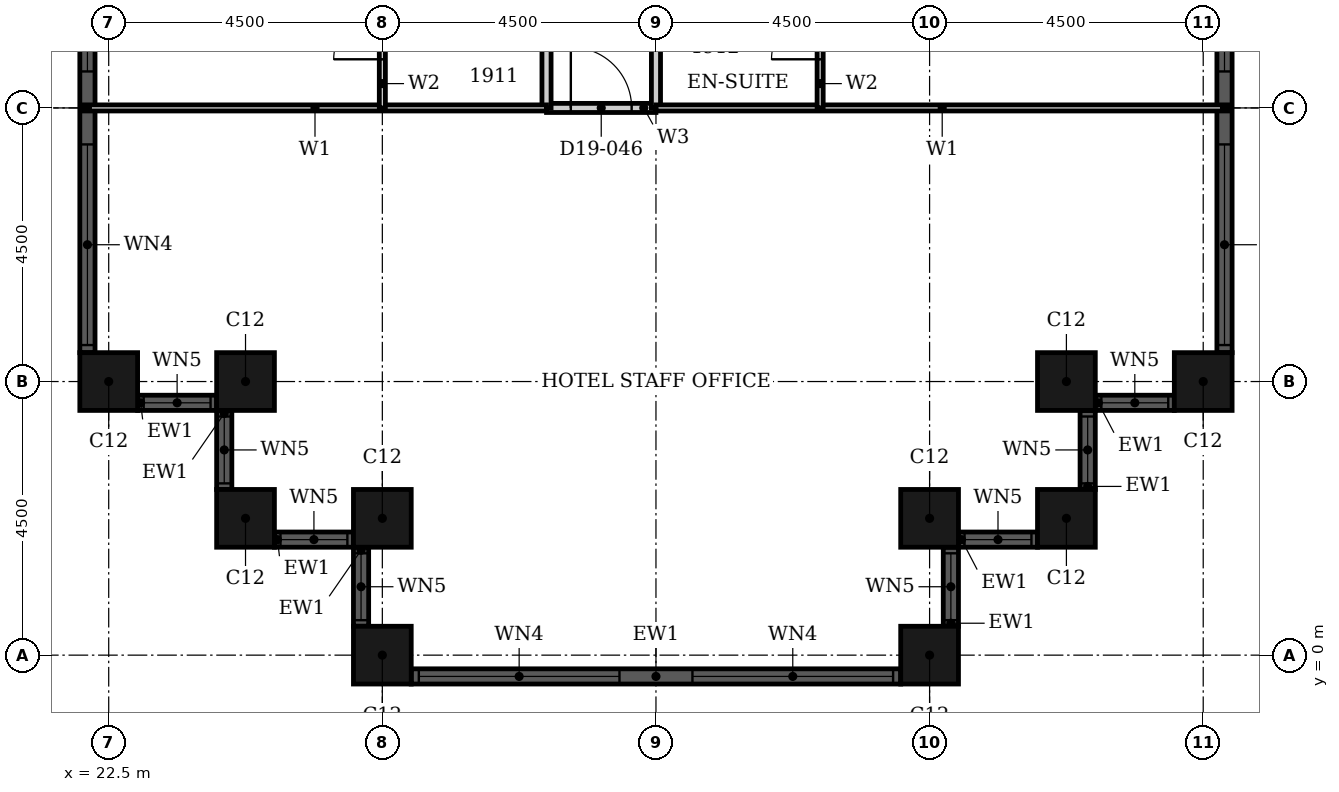
"""IFC4 building model, lengths in metres.
Left out: names, types, materials, properties, quantities, classifications, styles, units other than length and angle.
Written with IfcOpenShell. Run it as: python <this file> out.ifc"""

import sys

from ifc_helpers import new_model, si_unit, direction, frame, frame_2d, origin, origin_2d, place, context, subcontext, project, spatial, rectangle, hollow_rectangle, extrude, element, fill, save


model = new_model("IFC4")
c1 = context("Model", 3, precision=1e-05, world=origin(), true_north=direction((0.0, 1.0)))
c2 = subcontext(c1, "Body", "Model", "MODEL_VIEW")
j1 = project(units=[si_unit("LENGTHUNIT", "METRE"), si_unit("PLANEANGLEUNIT", "RADIAN")], contexts=[c1])
p1 = place(None, origin())
s1 = spatial("IfcSite", under=j1, at=p1, CompositionType="ELEMENT")
p2 = place(p1, origin())
s2 = spatial("IfcBuilding", under=s1, at=p2, CompositionType="ELEMENT")
p3 = place(p2, frame((0.0, 0.0, 81.6)))
s3 = spatial("IfcBuildingStorey", under=s2, at=p3, CompositionType="ELEMENT", Elevation=81.6)
for number, where, z_axis, x_axis in (
    (1, (22.5, 4.5, 0.0), (0.0, 0.0, 1.0), (1.0, 0.0, 0.0)),
    (2, (24.75, 4.5, 0.0), (0.0, 0.0, 1.0), (1.0, 0.0, 0.0)),
    (3, (24.75, 2.25, 0.0), (0.0, 0.0, 1.0), (1.0, 0.0, 0.0)),
    (4, (27.0, 2.25, 0.0), (0.0, 0.0, 1.0), (1.0, 0.0, 0.0)),
    (5, (27.0, 0.0, 0.0), (0.0, 0.0, 1.0), (1.0, 0.0, 0.0)),
    (6, (36.0, 0.0, 0.0), (0.0, 0.0, 1.0), (1.0, 0.0, 0.0)),
    (7, (36.0, 2.25, 0.0), (0.0, 0.0, 1.0), (1.0, 0.0, 0.0)),
    (8, (38.25, 2.25, 0.0), (0.0, 0.0, 1.0), (1.0, 0.0, 0.0)),
    (9, (38.25, 4.5, 0.0), (0.0, 0.0, 1.0), (1.0, 0.0, 0.0)),
    (10, (40.5, 4.5, 0.0), (0.0, 0.0, 1.0), (1.0, 0.0, 0.0)),
):
    element("IfcColumn", number, at=place(p3, frame(where, z_axis=z_axis, x_axis=x_axis)), inside=s3, PredefinedType="COLUMN", context=c2, shape_type="SweptSolid", body=[
        extrude(hollow_rectangle(XDim=0.95, YDim=0.95, WallThickness=0.03, at=origin_2d()), origin(), (0.0, 0.0, 1.0), 3.6),
    ])
p4 = place(p3, frame((22.975, 4.15, 0.0), z_axis=(0.0, 0.0, 1.0), x_axis=(1.0, 0.0, 0.0)))
e11 = element("IfcWall", 11, at=p4, inside=s3, PredefinedType="SOLIDWALL", context=c2, shape_type="SweptSolid", body=[
    extrude(rectangle(XDim=1.3, YDim=0.25, at=frame_2d((0.65, 0.0))), origin(), (0.0, 0.0, 1.0), 3.6),
])
p5 = place(p4, frame((0.1, 0.0, 0.9)))
e12 = element("IfcOpeningElement", 12, at=p5, cuts=e11, PredefinedType="OPENING", context=c2, shape_type="SweptSolid", body=[
    extrude(rectangle(XDim=1.1, YDim=2.08, at=frame_2d((0.55, 1.04))), frame((0.0, 0.135, 0.0), z_axis=(0.0, -1.0, 0.0), x_axis=(1.0, 0.0, 0.0)), (0.0, 0.0, 1.0), 0.27),
])
p6 = place(p3, frame((24.4, 4.025, 0.0), z_axis=(0.0, 0.0, 1.0), x_axis=(0.0, -1.0, 0.0)))
e13 = element("IfcWall", 13, at=p6, inside=s3, PredefinedType="SOLIDWALL", context=c2, shape_type="SweptSolid", body=[
    extrude(rectangle(XDim=1.3, YDim=0.25, at=frame_2d((0.65, 0.0))), origin(), (0.0, 0.0, 1.0), 3.6),
])
p7 = place(p6, frame((0.1, 0.0, 0.9)))
e14 = element("IfcOpeningElement", 14, at=p7, cuts=e13, PredefinedType="OPENING", context=c2, shape_type="SweptSolid", body=[
    extrude(rectangle(XDim=1.1, YDim=2.08, at=frame_2d((0.55, 1.04))), frame((0.0, 0.135, 0.0), z_axis=(0.0, -1.0, 0.0), x_axis=(1.0, 0.0, 0.0)), (0.0, 0.0, 1.0), 0.27),
])
p8 = place(p3, frame((25.225, 1.9, 0.0), z_axis=(0.0, 0.0, 1.0), x_axis=(1.0, 0.0, 0.0)))
e15 = element("IfcWall", 15, at=p8, inside=s3, PredefinedType="SOLIDWALL", context=c2, shape_type="SweptSolid", body=[
    extrude(rectangle(XDim=1.3, YDim=0.25, at=frame_2d((0.65, 0.0))), origin(), (0.0, 0.0, 1.0), 3.6),
])
p9 = place(p8, frame((0.1, 0.0, 0.9)))
e16 = element("IfcOpeningElement", 16, at=p9, cuts=e15, PredefinedType="OPENING", context=c2, shape_type="SweptSolid", body=[
    extrude(rectangle(XDim=1.1, YDim=2.08, at=frame_2d((0.55, 1.04))), frame((0.0, 0.135, 0.0), z_axis=(0.0, -1.0, 0.0), x_axis=(1.0, 0.0, 0.0)), (0.0, 0.0, 1.0), 0.27),
])
p10 = place(p3, frame((26.65, 1.775, 0.0), z_axis=(0.0, 0.0, 1.0), x_axis=(0.0, -1.0, 0.0)))
e17 = element("IfcWall", 17, at=p10, inside=s3, PredefinedType="SOLIDWALL", context=c2, shape_type="SweptSolid", body=[
    extrude(rectangle(XDim=1.3, YDim=0.25, at=frame_2d((0.65, 0.0))), origin(), (0.0, 0.0, 1.0), 3.6),
])
p11 = place(p10, frame((0.1, 0.0, 0.9)))
e18 = element("IfcOpeningElement", 18, at=p11, cuts=e17, PredefinedType="OPENING", context=c2, shape_type="SweptSolid", body=[
    extrude(rectangle(XDim=1.1, YDim=2.08, at=frame_2d((0.55, 1.04))), frame((0.0, 0.135, 0.0), z_axis=(0.0, -1.0, 0.0), x_axis=(1.0, 0.0, 0.0)), (0.0, 0.0, 1.0), 0.27),
])
p12 = place(p3, frame((27.475, -0.35, 0.0), z_axis=(0.0, 0.0, 1.0), x_axis=(1.0, 0.0, 0.0)))
e19 = element("IfcWall", 19, at=p12, inside=s3, PredefinedType="SOLIDWALL", context=c2, shape_type="SweptSolid", body=[
    extrude(rectangle(XDim=8.05, YDim=0.25, at=frame_2d((4.025, 0.0))), origin(), (0.0, 0.0, 1.0), 3.6),
])
p13 = place(p12, frame((0.125, 0.0, 0.9)))
e20 = element("IfcOpeningElement", 20, at=p13, cuts=e19, PredefinedType="OPENING", context=c2, shape_type="SweptSolid", body=[
    extrude(rectangle(XDim=3.3, YDim=2.08, at=frame_2d((1.65, 1.04))), frame((0.0, 0.135, 0.0), z_axis=(0.0, -1.0, 0.0), x_axis=(1.0, 0.0, 0.0)), (0.0, 0.0, 1.0), 0.27),
])
p14 = place(p12, frame((4.625, 0.0, 0.9)))
e21 = element("IfcOpeningElement", 21, at=p14, cuts=e19, PredefinedType="OPENING", context=c2, shape_type="SweptSolid", body=[
    extrude(rectangle(XDim=3.3, YDim=2.08, at=frame_2d((1.65, 1.04))), frame((0.0, 0.135, 0.0), z_axis=(0.0, -1.0, 0.0), x_axis=(1.0, 0.0, 0.0)), (0.0, 0.0, 1.0), 0.27),
])
p15 = place(p3, frame((36.35, 0.475, 0.0), z_axis=(0.0, 0.0, 1.0), x_axis=(0.0, 1.0, 0.0)))
e22 = element("IfcWall", 22, at=p15, inside=s3, PredefinedType="SOLIDWALL", context=c2, shape_type="SweptSolid", body=[
    extrude(rectangle(XDim=1.3, YDim=0.25, at=frame_2d((0.65, 0.0))), origin(), (0.0, 0.0, 1.0), 3.6),
])
p16 = place(p15, frame((0.1, 0.0, 0.9)))
e23 = element("IfcOpeningElement", 23, at=p16, cuts=e22, PredefinedType="OPENING", context=c2, shape_type="SweptSolid", body=[
    extrude(rectangle(XDim=1.1, YDim=2.08, at=frame_2d((0.55, 1.04))), frame((0.0, 0.135, 0.0), z_axis=(0.0, -1.0, 0.0), x_axis=(1.0, 0.0, 0.0)), (0.0, 0.0, 1.0), 0.27),
])
p17 = place(p3, frame((36.475, 1.9, 0.0), z_axis=(0.0, 0.0, 1.0), x_axis=(1.0, 0.0, 0.0)))
e24 = element("IfcWall", 24, at=p17, inside=s3, PredefinedType="SOLIDWALL", context=c2, shape_type="SweptSolid", body=[
    extrude(rectangle(XDim=1.3, YDim=0.25, at=frame_2d((0.65, 0.0))), origin(), (0.0, 0.0, 1.0), 3.6),
])
p18 = place(p17, frame((0.1, 0.0, 0.9)))
e25 = element("IfcOpeningElement", 25, at=p18, cuts=e24, PredefinedType="OPENING", context=c2, shape_type="SweptSolid", body=[
    extrude(rectangle(XDim=1.1, YDim=2.08, at=frame_2d((0.55, 1.04))), frame((0.0, 0.135, 0.0), z_axis=(0.0, -1.0, 0.0), x_axis=(1.0, 0.0, 0.0)), (0.0, 0.0, 1.0), 0.27),
])
p19 = place(p3, frame((38.6, 2.725, 0.0), z_axis=(0.0, 0.0, 1.0), x_axis=(0.0, 1.0, 0.0)))
e26 = element("IfcWall", 26, at=p19, inside=s3, PredefinedType="SOLIDWALL", context=c2, shape_type="SweptSolid", body=[
    extrude(rectangle(XDim=1.3, YDim=0.25, at=frame_2d((0.65, 0.0))), origin(), (0.0, 0.0, 1.0), 3.6),
])
p20 = place(p19, frame((0.1, 0.0, 0.9)))
e27 = element("IfcOpeningElement", 27, at=p20, cuts=e26, PredefinedType="OPENING", context=c2, shape_type="SweptSolid", body=[
    extrude(rectangle(XDim=1.1, YDim=2.08, at=frame_2d((0.55, 1.04))), frame((0.0, 0.135, 0.0), z_axis=(0.0, -1.0, 0.0), x_axis=(1.0, 0.0, 0.0)), (0.0, 0.0, 1.0), 0.27),
])
p21 = place(p3, frame((38.725, 4.15, 0.0), z_axis=(0.0, 0.0, 1.0), x_axis=(1.0, 0.0, 0.0)))
e28 = element("IfcWall", 28, at=p21, inside=s3, PredefinedType="SOLIDWALL", context=c2, shape_type="SweptSolid", body=[
    extrude(rectangle(XDim=1.3, YDim=0.25, at=frame_2d((0.65, 0.0))), origin(), (0.0, 0.0, 1.0), 3.6),
])
p22 = place(p21, frame((0.1, 0.0, 0.9)))
e29 = element("IfcOpeningElement", 29, at=p22, cuts=e28, PredefinedType="OPENING", context=c2, shape_type="SweptSolid", body=[
    extrude(rectangle(XDim=1.1, YDim=2.08, at=frame_2d((0.55, 1.04))), frame((0.0, 0.135, 0.0), z_axis=(0.0, -1.0, 0.0), x_axis=(1.0, 0.0, 0.0)), (0.0, 0.0, 1.0), 0.27),
])
p23 = place(p3, frame((40.85, 4.975, 0.0), z_axis=(0.0, 0.0, 1.0), x_axis=(0.0, 1.0, 0.0)))
e30 = element("IfcWall", 30, at=p23, inside=s3, PredefinedType="SOLIDWALL", context=c2, shape_type="SweptSolid", body=[
    extrude(rectangle(XDim=8.05, YDim=0.25, at=frame_2d((4.025, 0.0))), origin(), (0.0, 0.0, 1.0), 3.6),
])
p24 = place(p23, frame((0.125, 0.0, 0.9)))
e31 = element("IfcOpeningElement", 31, at=p24, cuts=e30, PredefinedType="OPENING", context=c2, shape_type="SweptSolid", body=[
    extrude(rectangle(XDim=3.3, YDim=2.08, at=frame_2d((1.65, 1.04))), frame((0.0, 0.135, 0.0), z_axis=(0.0, -1.0, 0.0), x_axis=(1.0, 0.0, 0.0)), (0.0, 0.0, 1.0), 0.27),
])
p25 = place(p23, frame((4.625, 0.0, 0.9)))
e32 = element("IfcOpeningElement", 32, at=p25, cuts=e30, PredefinedType="OPENING", context=c2, shape_type="SweptSolid", body=[
    extrude(rectangle(XDim=3.3, YDim=2.08, at=frame_2d((1.65, 1.04))), frame((0.0, 0.135, 0.0), z_axis=(0.0, -1.0, 0.0), x_axis=(1.0, 0.0, 0.0)), (0.0, 0.0, 1.0), 0.27),
])
p26 = place(p3, frame((22.15, 13.025, 0.0), z_axis=(0.0, 0.0, 1.0), x_axis=(0.0, -1.0, 0.0)))
e33 = element("IfcWall", 33, at=p26, inside=s3, PredefinedType="SOLIDWALL", context=c2, shape_type="SweptSolid", body=[
    extrude(rectangle(XDim=8.05, YDim=0.25, at=frame_2d((4.025, 0.0))), origin(), (0.0, 0.0, 1.0), 3.6),
])
p27 = place(p26, frame((0.125, 0.0, 0.9)))
e34 = element("IfcOpeningElement", 34, at=p27, cuts=e33, PredefinedType="OPENING", context=c2, shape_type="SweptSolid", body=[
    extrude(rectangle(XDim=3.3, YDim=2.08, at=frame_2d((1.65, 1.04))), frame((0.0, 0.135, 0.0), z_axis=(0.0, -1.0, 0.0), x_axis=(1.0, 0.0, 0.0)), (0.0, 0.0, 1.0), 0.27),
])
p28 = place(p26, frame((4.625, 0.0, 0.9)))
e35 = element("IfcOpeningElement", 35, at=p28, cuts=e33, PredefinedType="OPENING", context=c2, shape_type="SweptSolid", body=[
    extrude(rectangle(XDim=3.3, YDim=2.08, at=frame_2d((1.65, 1.04))), frame((0.0, 0.135, 0.0), z_axis=(0.0, -1.0, 0.0), x_axis=(1.0, 0.0, 0.0)), (0.0, 0.0, 1.0), 0.27),
])
p29 = place(p3, frame((29.7, 9.0, 0.0), z_axis=(0.0, 0.0, 1.0), x_axis=(1.0, 0.0, 0.0)))
e36 = element("IfcWall", 36, at=p29, inside=s3, PredefinedType="PARTITIONING", context=c2, shape_type="SweptSolid", body=[
    extrude(rectangle(XDim=1.8, YDim=0.15, at=frame_2d((0.9, 0.0))), origin(), (0.0, 0.0, 1.0), 3.3),
])
p30 = place(p29, frame((0.4, 0.0, 0.0)))
e37 = element("IfcOpeningElement", 37, at=p30, cuts=e36, PredefinedType="OPENING", context=c2, shape_type="SweptSolid", body=[
    extrude(rectangle(XDim=1.0, YDim=2.1, at=frame_2d((0.5, 1.05))), frame((0.0, 0.085, 0.0), z_axis=(0.0, -1.0, 0.0), x_axis=(1.0, 0.0, 0.0)), (0.0, 0.0, 1.0), 0.17),
])
p31 = place(p3, frame((29.7, 9.0, 0.0), z_axis=(0.0, 0.0, 1.0), x_axis=(0.0, 1.0, 0.0)))
e38 = element("IfcWall", 38, at=p31, inside=s3, PredefinedType="PARTITIONING", context=c2, shape_type="SweptSolid", body=[
    extrude(rectangle(XDim=11.7, YDim=0.15, at=frame_2d((5.85, 0.0))), origin(), (0.0, 0.0, 1.0), 3.3),
])
p32 = place(p31, frame((2.95, 0.0, 0.0)))
e39 = element("IfcOpeningElement", 39, at=p32, cuts=e38, PredefinedType="OPENING", context=c2, shape_type="SweptSolid", body=[
    extrude(rectangle(XDim=1.0, YDim=2.1, at=frame_2d((0.5, 1.05))), frame((0.0, 0.085, 0.0), z_axis=(0.0, -1.0, 0.0), x_axis=(1.0, 0.0, 0.0)), (0.0, 0.0, 1.0), 0.17),
])
p33 = place(p3, frame((31.5, 9.0, 0.0), z_axis=(0.0, 0.0, 1.0), x_axis=(0.0, 1.0, 0.0)))
e40 = element("IfcWall", 40, at=p33, inside=s3, PredefinedType="PARTITIONING", context=c2, shape_type="SweptSolid", body=[
    extrude(rectangle(XDim=11.7, YDim=0.15, at=frame_2d((5.85, 0.0))), origin(), (0.0, 0.0, 1.0), 2.58),
])
p34 = place(p33, frame((2.95, 0.0, 0.0)))
e41 = element("IfcOpeningElement", 41, at=p34, cuts=e40, PredefinedType="OPENING", context=c2, shape_type="SweptSolid", body=[
    extrude(rectangle(XDim=1.0, YDim=2.1, at=frame_2d((0.5, 1.05))), frame((0.0, 0.085, 0.0), z_axis=(0.0, -1.0, 0.0), x_axis=(1.0, 0.0, 0.0)), (0.0, 0.0, 1.0), 0.17),
])
p35 = place(p3, frame((31.5, 9.0, 0.0), z_axis=(0.0, 0.0, 1.0), x_axis=(1.0, 0.0, 0.0)))
e42 = element("IfcWall", 42, at=p35, inside=s3, PredefinedType="PARTITIONING", context=c2, shape_type="SweptSolid", body=[
    extrude(rectangle(XDim=9.415, YDim=0.1, at=frame_2d((4.708, 0.0))), origin(), (0.0, 0.0, 1.0), 3.3),
])
p36 = place(p3, frame((22.085, 9.0, 0.0), z_axis=(0.0, 0.0, 1.0), x_axis=(1.0, 0.0, 0.0)))
e43 = element("IfcWall", 43, at=p36, inside=s3, PredefinedType="PARTITIONING", context=c2, shape_type="SweptSolid", body=[
    extrude(rectangle(XDim=7.615, YDim=0.1, at=frame_2d((3.808, 0.0))), origin(), (0.0, 0.0, 1.0), 3.3),
])
p37 = place(p3, frame((27.0, 9.0, 0.0), z_axis=(0.0, 0.0, 1.0), x_axis=(0.0, 1.0, 0.0)))
e44 = element("IfcWall", 44, at=p37, inside=s3, PredefinedType="PARTITIONING", context=c2, shape_type="SweptSolid", body=[
    extrude(rectangle(XDim=2.4, YDim=0.1, at=frame_2d((1.2, 0.0))), origin(), (0.0, 0.0, 1.0), 2.58),
])
p38 = place(p37, frame((0.8, 0.0, 0.0)))
e45 = element("IfcOpeningElement", 45, at=p38, cuts=e44, PredefinedType="OPENING", context=c2, shape_type="SweptSolid", body=[
    extrude(rectangle(XDim=0.8, YDim=2.1, at=frame_2d((0.4, 1.05))), frame((0.0, 0.06, 0.0), z_axis=(0.0, -1.0, 0.0), x_axis=(1.0, 0.0, 0.0)), (0.0, 0.0, 1.0), 0.12),
])
p39 = place(p3, frame((34.2, 9.0, 0.0), z_axis=(0.0, 0.0, 1.0), x_axis=(0.0, 1.0, 0.0)))
e46 = element("IfcWall", 46, at=p39, inside=s3, PredefinedType="PARTITIONING", context=c2, shape_type="SweptSolid", body=[
    extrude(rectangle(XDim=2.4, YDim=0.1, at=frame_2d((1.2, 0.0))), origin(), (0.0, 0.0, 1.0), 3.3),
])
p40 = place(p39, frame((0.8, 0.0, 0.0)))
e47 = element("IfcOpeningElement", 47, at=p40, cuts=e46, PredefinedType="OPENING", context=c2, shape_type="SweptSolid", body=[
    extrude(rectangle(XDim=0.8, YDim=2.1, at=frame_2d((0.4, 1.05))), frame((0.0, 0.06, 0.0), z_axis=(0.0, -1.0, 0.0), x_axis=(1.0, 0.0, 0.0)), (0.0, 0.0, 1.0), 0.12),
])
p41 = place(p5, origin())
e48 = element("IfcWindow", 48, at=p41, inside=s3, PartitioningType="SINGLE_PANEL", PredefinedType="WINDOW", context=c2, shape_type="SweptSolid", body=[
    extrude(rectangle(XDim=1.1, YDim=2.08, at=frame_2d((0.55, 1.04))), frame((0.0, 0.03, 0.0), z_axis=(0.0, -1.0, 0.0), x_axis=(1.0, 0.0, 0.0)), (0.0, 0.0, 1.0), 0.06),
])
fill(e12, e48)
p42 = place(p7, origin())
e49 = element("IfcWindow", 49, at=p42, inside=s3, PartitioningType="SINGLE_PANEL", PredefinedType="WINDOW", context=c2, shape_type="SweptSolid", body=[
    extrude(rectangle(XDim=1.1, YDim=2.08, at=frame_2d((0.55, 1.04))), frame((0.0, 0.03, 0.0), z_axis=(0.0, -1.0, 0.0), x_axis=(1.0, 0.0, 0.0)), (0.0, 0.0, 1.0), 0.06),
])
fill(e14, e49)
p43 = place(p9, origin())
e50 = element("IfcWindow", 50, at=p43, inside=s3, PartitioningType="SINGLE_PANEL", PredefinedType="WINDOW", context=c2, shape_type="SweptSolid", body=[
    extrude(rectangle(XDim=1.1, YDim=2.08, at=frame_2d((0.55, 1.04))), frame((0.0, 0.03, 0.0), z_axis=(0.0, -1.0, 0.0), x_axis=(1.0, 0.0, 0.0)), (0.0, 0.0, 1.0), 0.06),
])
fill(e16, e50)
p44 = place(p11, origin())
e51 = element("IfcWindow", 51, at=p44, inside=s3, PartitioningType="SINGLE_PANEL", PredefinedType="WINDOW", context=c2, shape_type="SweptSolid", body=[
    extrude(rectangle(XDim=1.1, YDim=2.08, at=frame_2d((0.55, 1.04))), frame((0.0, 0.03, 0.0), z_axis=(0.0, -1.0, 0.0), x_axis=(1.0, 0.0, 0.0)), (0.0, 0.0, 1.0), 0.06),
])
fill(e18, e51)
p45 = place(p13, origin())
e52 = element("IfcWindow", 52, at=p45, inside=s3, PartitioningType="SINGLE_PANEL", PredefinedType="WINDOW", context=c2, shape_type="SweptSolid", body=[
    extrude(rectangle(XDim=3.3, YDim=2.08, at=frame_2d((1.65, 1.04))), frame((0.0, 0.03, 0.0), z_axis=(0.0, -1.0, 0.0), x_axis=(1.0, 0.0, 0.0)), (0.0, 0.0, 1.0), 0.06),
])
fill(e20, e52)
p46 = place(p14, origin())
e53 = element("IfcWindow", 53, at=p46, inside=s3, PartitioningType="SINGLE_PANEL", PredefinedType="WINDOW", context=c2, shape_type="SweptSolid", body=[
    extrude(rectangle(XDim=3.3, YDim=2.08, at=frame_2d((1.65, 1.04))), frame((0.0, 0.03, 0.0), z_axis=(0.0, -1.0, 0.0), x_axis=(1.0, 0.0, 0.0)), (0.0, 0.0, 1.0), 0.06),
])
fill(e21, e53)
p47 = place(p16, origin())
e54 = element("IfcWindow", 54, at=p47, inside=s3, PartitioningType="SINGLE_PANEL", PredefinedType="WINDOW", context=c2, shape_type="SweptSolid", body=[
    extrude(rectangle(XDim=1.1, YDim=2.08, at=frame_2d((0.55, 1.04))), frame((0.0, 0.03, 0.0), z_axis=(0.0, -1.0, 0.0), x_axis=(1.0, 0.0, 0.0)), (0.0, 0.0, 1.0), 0.06),
])
fill(e23, e54)
p48 = place(p18, origin())
e55 = element("IfcWindow", 55, at=p48, inside=s3, PartitioningType="SINGLE_PANEL", PredefinedType="WINDOW", context=c2, shape_type="SweptSolid", body=[
    extrude(rectangle(XDim=1.1, YDim=2.08, at=frame_2d((0.55, 1.04))), frame((0.0, 0.03, 0.0), z_axis=(0.0, -1.0, 0.0), x_axis=(1.0, 0.0, 0.0)), (0.0, 0.0, 1.0), 0.06),
])
fill(e25, e55)
p49 = place(p20, origin())
e56 = element("IfcWindow", 56, at=p49, inside=s3, PartitioningType="SINGLE_PANEL", PredefinedType="WINDOW", context=c2, shape_type="SweptSolid", body=[
    extrude(rectangle(XDim=1.1, YDim=2.08, at=frame_2d((0.55, 1.04))), frame((0.0, 0.03, 0.0), z_axis=(0.0, -1.0, 0.0), x_axis=(1.0, 0.0, 0.0)), (0.0, 0.0, 1.0), 0.06),
])
fill(e27, e56)
p50 = place(p22, origin())
e57 = element("IfcWindow", 57, at=p50, inside=s3, PartitioningType="SINGLE_PANEL", PredefinedType="WINDOW", context=c2, shape_type="SweptSolid", body=[
    extrude(rectangle(XDim=1.1, YDim=2.08, at=frame_2d((0.55, 1.04))), frame((0.0, 0.03, 0.0), z_axis=(0.0, -1.0, 0.0), x_axis=(1.0, 0.0, 0.0)), (0.0, 0.0, 1.0), 0.06),
])
fill(e29, e57)
p51 = place(p24, origin())
e58 = element("IfcWindow", 58, at=p51, inside=s3, PartitioningType="SINGLE_PANEL", PredefinedType="WINDOW", context=c2, shape_type="SweptSolid", body=[
    extrude(rectangle(XDim=3.3, YDim=2.08, at=frame_2d((1.65, 1.04))), frame((0.0, 0.03, 0.0), z_axis=(0.0, -1.0, 0.0), x_axis=(1.0, 0.0, 0.0)), (0.0, 0.0, 1.0), 0.06),
])
fill(e31, e58)
p52 = place(p25, origin())
e59 = element("IfcWindow", 59, at=p52, inside=s3, PartitioningType="SINGLE_PANEL", PredefinedType="WINDOW", context=c2, shape_type="SweptSolid", body=[
    extrude(rectangle(XDim=3.3, YDim=2.08, at=frame_2d((1.65, 1.04))), frame((0.0, 0.03, 0.0), z_axis=(0.0, -1.0, 0.0), x_axis=(1.0, 0.0, 0.0)), (0.0, 0.0, 1.0), 0.06),
])
fill(e32, e59)
p53 = place(p27, origin())
e60 = element("IfcWindow", 60, at=p53, inside=s3, PartitioningType="SINGLE_PANEL", PredefinedType="WINDOW", context=c2, shape_type="SweptSolid", body=[
    extrude(rectangle(XDim=3.3, YDim=2.08, at=frame_2d((1.65, 1.04))), frame((0.0, 0.03, 0.0), z_axis=(0.0, -1.0, 0.0), x_axis=(1.0, 0.0, 0.0)), (0.0, 0.0, 1.0), 0.06),
])
fill(e34, e60)
p54 = place(p28, origin())
e61 = element("IfcWindow", 61, at=p54, inside=s3, PartitioningType="SINGLE_PANEL", PredefinedType="WINDOW", context=c2, shape_type="SweptSolid", body=[
    extrude(rectangle(XDim=3.3, YDim=2.08, at=frame_2d((1.65, 1.04))), frame((0.0, 0.03, 0.0), z_axis=(0.0, -1.0, 0.0), x_axis=(1.0, 0.0, 0.0)), (0.0, 0.0, 1.0), 0.06),
])
fill(e35, e61)
p55 = place(p38, origin())
e62 = element("IfcDoor", 62, at=p55, inside=s3, OperationType="SINGLE_SWING_RIGHT", PredefinedType="DOOR", context=c2, shape_type="SweptSolid", body=[
    extrude(rectangle(XDim=0.8, YDim=2.1, at=frame_2d((0.4, 1.05))), frame((0.0, 0.025, 0.0), z_axis=(0.0, -1.0, 0.0), x_axis=(1.0, 0.0, 0.0)), (0.0, 0.0, 1.0), 0.05),
])
fill(e45, e62)
p56 = place(p40, origin())
e63 = element("IfcDoor", 63, at=p56, inside=s3, OperationType="SINGLE_SWING_LEFT", PredefinedType="DOOR", context=c2, shape_type="SweptSolid", body=[
    extrude(rectangle(XDim=0.8, YDim=2.1, at=frame_2d((0.4, 1.05))), frame((0.0, 0.025, 0.0), z_axis=(0.0, -1.0, 0.0), x_axis=(1.0, 0.0, 0.0)), (0.0, 0.0, 1.0), 0.05),
])
fill(e47, e63)
p57 = place(p30, origin())
e64 = element("IfcDoor", 64, at=p57, inside=s3, OperationType="SINGLE_SWING_LEFT", PredefinedType="DOOR", context=c2, shape_type="SweptSolid", body=[
    extrude(rectangle(XDim=1.0, YDim=2.1, at=frame_2d((0.5, 1.05))), frame((0.0, 0.025, 0.0), z_axis=(0.0, -1.0, 0.0), x_axis=(1.0, 0.0, 0.0)), (0.0, 0.0, 1.0), 0.05),
])
fill(e37, e64)
save(model, sys.argv[1])
